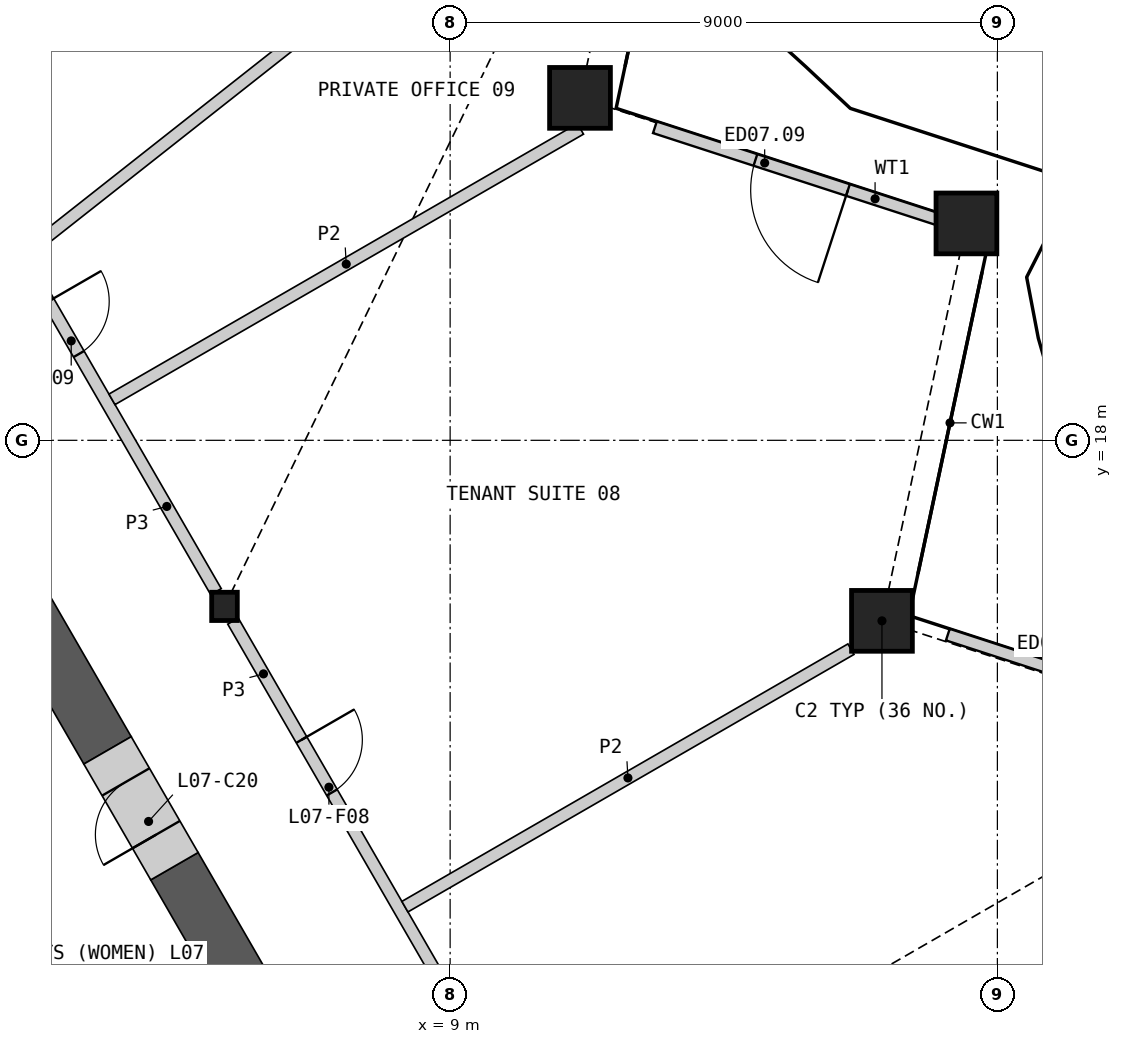
"""IFC4 building model, lengths in metres.
Left out: names, types, materials, properties, quantities, classifications, styles, units other than length and angle.
Written with IfcOpenShell. Run it as: python <this file> out.ifc"""

import sys

from ifc_helpers import new_model, si_unit, direction, frame, frame_2d, origin, origin_2d, place, context, subcontext, project, spatial, rectangle, hollow_rectangle, i_section, extrude, element, fill, save


model = new_model("IFC4")
c1 = context("Model", 3, precision=1e-05, world=origin(), true_north=direction((0.0, 1.0)))
c2 = subcontext(c1, "Body", "Model", "MODEL_VIEW")
j1 = project(units=[si_unit("LENGTHUNIT", "METRE"), si_unit("PLANEANGLEUNIT", "RADIAN")], contexts=[c1])
p1 = place(None, origin())
s1 = spatial("IfcSite", under=j1, at=p1, CompositionType="ELEMENT")
p2 = place(p1, origin())
s2 = spatial("IfcBuilding", under=s1, at=p2, CompositionType="ELEMENT")
p3 = place(p2, frame((0.0, 0.0, 38.4)))
s3 = spatial("IfcBuildingStorey", under=s2, at=p3, CompositionType="ELEMENT", Elevation=38.4)
for number, where, z_axis, x_axis in (
    (1, (16.102, 15.031, 0.0), (0.0, 0.0, 1.0), (1.0, 0.0, 0.0)),
    (2, (17.491, 21.567, 0.0), (0.0, 0.0, 1.0), (1.0, 0.0, 0.0)),
    (3, (11.136, 23.632, 0.0), (0.0, 0.0, 1.0), (1.0, 0.0, 0.0)),
):
    element("IfcColumn", number, at=place(p3, frame(where, z_axis=z_axis, x_axis=x_axis)), inside=s3, PredefinedType="COLUMN", context=c2, shape_type="SweptSolid", body=[
        extrude(hollow_rectangle(XDim=1.0, YDim=1.0, WallThickness=0.07, at=origin_2d()), origin(), (0.0, 0.0, 1.0), 4.2),
    ])
p4 = place(p3, frame((5.289, 15.269, 0.0), z_axis=(0.0, 0.0, 1.0), x_axis=(1.0, 0.0, 0.0)))
e4 = element("IfcColumn", 4, at=p4, inside=s3, PredefinedType="COLUMN", context=c2, shape_type="SweptSolid", body=[
    extrude(i_section(OverallWidth=0.421, OverallDepth=0.465, WebThickness=0.045, FlangeThickness=0.072, at=origin_2d()), origin(), (0.0, 0.0, 1.0), 4.2),
])
p5 = place(p3, frame((22.013, 13.235, 0.0), z_axis=(0.0, 0.0, 1.0), x_axis=(-0.951051031059, 0.309033875687, 0.0)))
e5 = element("IfcWall", 5, at=p5, inside=s3, PredefinedType="SOLIDWALL", context=c2, shape_type="SweptSolid", body=[
    extrude(rectangle(XDim=5.077, YDim=0.2, at=frame_2d((2.538, 0.0))), origin(), (0.0, 0.0, 1.0), 3.189),
])
p6 = place(p5, frame((1.738, 0.0, 0.0)))
e6 = element("IfcOpeningElement", 6, at=p6, cuts=e5, PredefinedType="OPENING", context=c2, shape_type="SweptSolid", body=[
    extrude(rectangle(XDim=1.6, YDim=2.4, at=frame_2d((0.8, 1.2))), frame((0.0, 0.11, 0.0), z_axis=(0.0, -1.0, 0.0), x_axis=(1.0, 0.0, 0.0)), (0.0, 0.0, 1.0), 0.22),
])
p7 = place(p3, frame((17.196, 21.58, 0.0), z_axis=(0.0, 0.0, 1.0), x_axis=(-0.951051031059, 0.309033875687, 0.0)))
e7 = element("IfcWall", 7, at=p7, inside=s3, PredefinedType="SOLIDWALL", context=c2, shape_type="SweptSolid", body=[
    extrude(rectangle(XDim=5.077, YDim=0.2, at=frame_2d((2.538, 0.0))), origin(), (0.0, 0.0, 1.0), 3.189),
])
p8 = place(p7, frame((1.738, 0.0, 0.0)))
e8 = element("IfcOpeningElement", 8, at=p8, cuts=e7, PredefinedType="OPENING", context=c2, shape_type="SweptSolid", body=[
    extrude(rectangle(XDim=1.6, YDim=2.4, at=frame_2d((0.8, 1.2))), frame((0.0, 0.11, 0.0), z_axis=(0.0, -1.0, 0.0), x_axis=(1.0, 0.0, 0.0)), (0.0, 0.0, 1.0), 0.22),
])
p9 = place(p3, frame((8.16, 4.596, 0.0), z_axis=(0.0, 0.0, 1.0), x_axis=(-0.500012259336, 0.866018325738, 0.0)))
e9 = element("IfcWall", 9, at=p9, inside=s3, PredefinedType="SHEAR", context=c2, shape_type="SweptSolid", body=[
    extrude(rectangle(XDim=7.389, YDim=0.9, at=frame_2d((3.695, 0.0))), origin(), (0.0, 0.0, 1.0), 3.8),
])
p10 = place(p3, frame((3.365, 12.9, 0.0), z_axis=(0.0, 0.0, 1.0), x_axis=(-0.499981657175, 0.86603599376, 0.0)))
e10 = element("IfcWall", 10, at=p10, inside=s3, PredefinedType="SHEAR", context=c2, shape_type="SweptSolid", body=[
    extrude(rectangle(XDim=5.952, YDim=0.9, at=frame_2d((2.976, 0.0))), origin(), (0.0, 0.0, 1.0), 3.8),
])
p11 = place(p3, frame((4.466, 10.995, 0.0), z_axis=(0.0, 0.0, 1.0), x_axis=(-0.500077893725, 0.86598042715, 0.0)))
e11 = element("IfcWall", 11, at=p11, inside=s3, PredefinedType="SHEAR", context=c2, shape_type="SweptSolid", body=[
    extrude(rectangle(XDim=2.2, YDim=0.9, at=frame_2d((1.1, 0.0))), origin(), (0.0, 0.0, 1.0), 3.8),
])
p12 = place(p11, frame((0.6, 0.0, 0.0)))
e12 = element("IfcOpeningElement", 12, at=p12, cuts=e11, PredefinedType="OPENING", context=c2, shape_type="SweptSolid", body=[
    extrude(rectangle(XDim=1.0, YDim=2.1, at=frame_2d((0.5, 1.05))), frame((0.0, 0.46, 0.0), z_axis=(0.0, -1.0, 0.0), x_axis=(1.0, 0.0, 0.0)), (0.0, 0.0, 1.0), 0.92),
])
p13 = place(p3, frame((5.429, 15.026, 0.0), z_axis=(0.0, 0.0, 1.0), x_axis=(0.50001002959, -0.86601961312, 0.0)))
e13 = element("IfcWall", 13, at=p13, inside=s3, PredefinedType="PARTITIONING", context=c2, shape_type="SweptSolid", body=[
    extrude(rectangle(XDim=10.019, YDim=0.2, at=frame_2d((5.009, 0.0))), origin(), (0.0, 0.0, 1.0), 3.8),
])
p14 = place(p13, frame((7.266, 0.0, 0.0)))
e14 = element("IfcOpeningElement", 14, at=p14, cuts=e13, PredefinedType="OPENING", context=c2, shape_type="SweptSolid", body=[
    extrude(rectangle(XDim=1.0, YDim=2.1, at=frame_2d((0.5, 1.05))), frame((0.0, 0.11, 0.0), z_axis=(0.0, -1.0, 0.0), x_axis=(1.0, 0.0, 0.0)), (0.0, 0.0, 1.0), 0.22),
])
p15 = place(p13, frame((2.254, 0.0, 0.0)))
e15 = element("IfcOpeningElement", 15, at=p15, cuts=e13, PredefinedType="OPENING", context=c2, shape_type="SweptSolid", body=[
    extrude(rectangle(XDim=1.0, YDim=2.1, at=frame_2d((0.5, 1.05))), frame((0.0, 0.11, 0.0), z_axis=(0.0, -1.0, 0.0), x_axis=(1.0, 0.0, 0.0)), (0.0, 0.0, 1.0), 0.22),
])
p16 = place(p3, frame((1.913, 21.116, 0.0), z_axis=(0.0, 0.0, 1.0), x_axis=(0.500001069878, -0.866024786089, 0.0)))
e16 = element("IfcWall", 16, at=p16, inside=s3, PredefinedType="PARTITIONING", context=c2, shape_type="SweptSolid", body=[
    extrude(rectangle(XDim=6.473, YDim=0.2, at=frame_2d((3.236, 0.0))), origin(), (0.0, 0.0, 1.0), 3.8),
])
p17 = place(p16, frame((0.96, 0.0, 0.0)))
e17 = element("IfcOpeningElement", 17, at=p17, cuts=e16, PredefinedType="OPENING", context=c2, shape_type="SweptSolid", body=[
    extrude(rectangle(XDim=1.0, YDim=2.1, at=frame_2d((0.5, 1.05))), frame((0.0, 0.11, 0.0), z_axis=(0.0, -1.0, 0.0), x_axis=(1.0, 0.0, 0.0)), (0.0, 0.0, 1.0), 0.22),
])
p18 = place(p3, frame((2.042, 21.092, 0.0), z_axis=(0.0, 0.0, 1.0), x_axis=(0.78529358076, 0.619123567648, 0.0)))
e18 = element("IfcWall", 18, at=p18, inside=s3, PredefinedType="PARTITIONING", context=c2, shape_type="SweptSolid", body=[
    extrude(rectangle(XDim=13.837, YDim=0.2, at=frame_2d((6.918, 0.0))), origin(), (0.0, 0.0, 1.0), 2.885),
])
p19 = place(p3, frame((3.439, 18.674, 0.0), z_axis=(0.0, 0.0, 1.0), x_axis=(0.866020616849, 0.500008291124, 0.0)))
e19 = element("IfcWall", 19, at=p19, inside=s3, PredefinedType="PARTITIONING", context=c2, shape_type="SweptSolid", body=[
    extrude(rectangle(XDim=8.897, YDim=0.2, at=frame_2d((4.448, 0.0))), origin(), (0.0, 0.0, 1.0), 2.885),
])
p20 = place(p3, frame((8.256, 10.33, 0.0), z_axis=(0.0, 0.0, 1.0), x_axis=(0.866026229868, 0.499998569178, 0.0)))
e20 = element("IfcWall", 20, at=p20, inside=s3, PredefinedType="PARTITIONING", context=c2, shape_type="SweptSolid", body=[
    extrude(rectangle(XDim=8.47, YDim=0.2, at=frame_2d((4.235, 0.0))), origin(), (0.0, 0.0, 1.0), 2.885),
])
p21 = place(p8, origin())
e21 = element("IfcDoor", 21, at=p21, inside=s3, OperationType="DOUBLE_DOOR_SINGLE_SWING", PredefinedType="DOOR", context=c2, shape_type="SweptSolid", body=[
    extrude(rectangle(XDim=1.6, YDim=2.4, at=frame_2d((0.8, 1.2))), frame((0.0, 0.025, 0.0), z_axis=(0.0, -1.0, 0.0), x_axis=(1.0, 0.0, 0.0)), (0.0, 0.0, 1.0), 0.05),
])
fill(e8, e21)
p22 = place(p12, origin())
e22 = element("IfcDoor", 22, at=p22, inside=s3, OperationType="SINGLE_SWING_LEFT", PredefinedType="DOOR", context=c2, shape_type="SweptSolid", body=[
    extrude(rectangle(XDim=1.0, YDim=2.1, at=frame_2d((0.5, 1.05))), frame((0.0, 0.205, 0.0), z_axis=(0.0, -1.0, 0.0), x_axis=(1.0, 0.0, 0.0)), (0.0, 0.0, 1.0), 0.05),
])
fill(e12, e22)
p23 = place(p15, origin())
e23 = element("IfcDoor", 23, at=p23, inside=s3, OperationType="SINGLE_SWING_LEFT", PredefinedType="DOOR", context=c2, shape_type="SweptSolid", body=[
    extrude(rectangle(XDim=1.0, YDim=2.1, at=frame_2d((0.5, 1.05))), frame((0.0, 0.025, 0.0), z_axis=(0.0, -1.0, 0.0), x_axis=(1.0, 0.0, 0.0)), (0.0, 0.0, 1.0), 0.05),
])
fill(e15, e23)
p24 = place(p17, origin())
e24 = element("IfcDoor", 24, at=p24, inside=s3, OperationType="SINGLE_SWING_LEFT", PredefinedType="DOOR", context=c2, shape_type="SweptSolid", body=[
    extrude(rectangle(XDim=1.0, YDim=2.1, at=frame_2d((0.5, 1.05))), frame((0.0, 0.025, 0.0), z_axis=(0.0, -1.0, 0.0), x_axis=(1.0, 0.0, 0.0)), (0.0, 0.0, 1.0), 0.05),
])
fill(e17, e24)
save(model, sys.argv[1])
